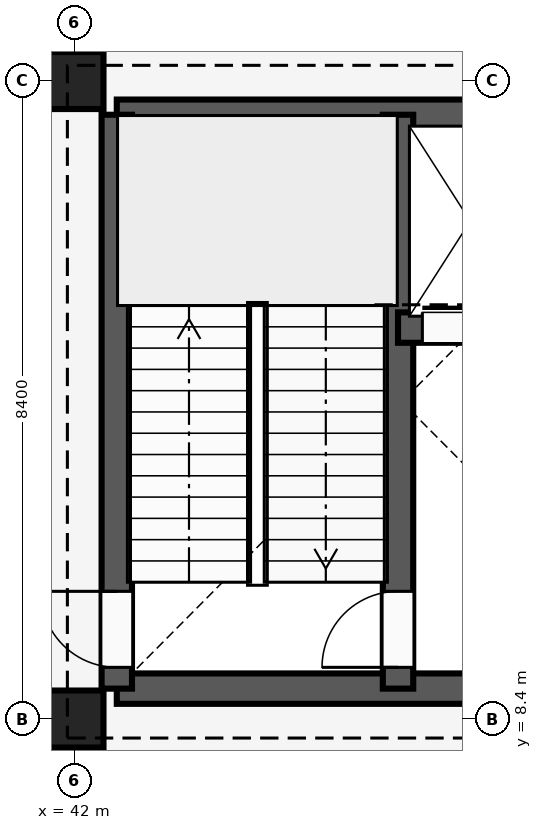
"""IFC4 building model, lengths in metres.
Left out: names, types, materials, properties, quantities, classifications, styles, units other than length and angle.
Written with IfcOpenShell. Run it as: python <this file> out.ifc"""

import sys

from ifc_helpers import new_model, si_unit, direction, frame, frame_2d, origin, origin_2d, place, context, subcontext, project, spatial, rectangle, extrude, element, fill, save


model = new_model("IFC4")
c1 = context("Model", 3, precision=1e-05, world=origin(), true_north=direction((0.0, 1.0)))
c2 = subcontext(c1, "Body", "Model", "MODEL_VIEW")
j1 = project(units=[si_unit("LENGTHUNIT", "METRE"), si_unit("PLANEANGLEUNIT", "RADIAN")], contexts=[c1])
p1 = place(None, origin())
s1 = spatial("IfcSite", under=j1, at=p1, CompositionType="ELEMENT")
p2 = place(p1, origin())
s2 = spatial("IfcBuilding", under=s1, at=p2, CompositionType="ELEMENT")
p3 = place(p2, frame((0.0, 0.0, 8.1)))
s3 = spatial("IfcBuildingStorey", under=s2, at=p3, CompositionType="ELEMENT", Elevation=8.1)
for number, where, z_axis, x_axis in (
    (1, (42.0, 8.4, 0.0), (0.0, 0.0, 1.0), (1.0, 0.0, 0.0)),
    (2, (42.0, 16.8, 0.0), (0.0, 0.0, 1.0), (1.0, 0.0, 0.0)),
):
    element("IfcColumn", number, at=place(p3, frame(where, z_axis=z_axis, x_axis=x_axis)), inside=s3, PredefinedType="COLUMN", context=c2, shape_type="SweptSolid", body=[
        extrude(rectangle(XDim=0.75, YDim=0.75, at=origin_2d()), origin(), (0.0, 0.0, 1.0), 4.8),
    ])
p4 = place(p3, frame((42.55, 8.8, 0.0), z_axis=(0.0, 0.0, 1.0), x_axis=(1.0, 0.0, 0.0)))
e3 = element("IfcWall", 3, at=p4, inside=s3, PredefinedType="SHEAR", context=c2, shape_type="SweptSolid", body=[
    extrude(rectangle(XDim=7.5, YDim=0.4, at=frame_2d((3.75, 0.0))), origin(), (0.0, 0.0, 1.0), 4.52),
])
p5 = place(p4, frame((4.85, 0.0, 0.0)))
e4 = element("IfcOpeningElement", 4, at=p5, cuts=e3, PredefinedType="OPENING", context=c2, shape_type="SweptSolid", body=[
    extrude(rectangle(XDim=1.2, YDim=2.2, at=frame_2d((0.6, 1.1))), frame((0.0, 0.21, 0.0), z_axis=(0.0, -1.0, 0.0), x_axis=(1.0, 0.0, 0.0)), (0.0, 0.0, 1.0), 0.42),
])
p6 = place(p3, frame((42.55, 16.35, 0.0), z_axis=(0.0, 0.0, 1.0), x_axis=(1.0, 0.0, 0.0)))
e5 = element("IfcWall", 5, at=p6, inside=s3, PredefinedType="SHEAR", context=c2, shape_type="SweptSolid", body=[
    extrude(rectangle(XDim=7.5, YDim=0.4, at=frame_2d((3.75, 0.0))), origin(), (0.0, 0.0, 1.0), 4.52),
])
p7 = place(p3, frame((42.55, 8.8, 0.0), z_axis=(0.0, 0.0, 1.0), x_axis=(0.0, 1.0, 0.0)))
e6 = element("IfcWall", 6, at=p7, inside=s3, PredefinedType="SHEAR", context=c2, shape_type="SweptSolid", body=[
    extrude(rectangle(XDim=7.55, YDim=0.4, at=frame_2d((3.775, 0.0))), origin(), (0.0, 0.0, 1.0), 4.52),
])
p8 = place(p7, frame((0.28, 0.0, 0.0)))
e7 = element("IfcOpeningElement", 7, at=p8, cuts=e6, PredefinedType="OPENING", context=c2, shape_type="SweptSolid", body=[
    extrude(rectangle(XDim=1.0, YDim=2.15, at=frame_2d((0.5, 1.075))), frame((0.0, 0.21, 0.0), z_axis=(0.0, -1.0, 0.0), x_axis=(1.0, 0.0, 0.0)), (0.0, 0.0, 1.0), 0.42),
])
p9 = place(p3, frame((46.25, 8.8, 0.0), z_axis=(0.0, 0.0, 1.0), x_axis=(0.0, 1.0, 0.0)))
e8 = element("IfcWall", 8, at=p9, inside=s3, PredefinedType="SHEAR", context=c2, shape_type="SweptSolid", body=[
    extrude(rectangle(XDim=7.55, YDim=0.4, at=frame_2d((3.775, 0.0))), origin(), (0.0, 0.0, 1.0), 4.52),
])
p10 = place(p9, frame((0.28, 0.0, 0.0)))
e9 = element("IfcOpeningElement", 9, at=p10, cuts=e8, PredefinedType="OPENING", context=c2, shape_type="SweptSolid", body=[
    extrude(rectangle(XDim=1.0, YDim=2.15, at=frame_2d((0.5, 1.075))), frame((0.0, 0.21, 0.0), z_axis=(0.0, -1.0, 0.0), x_axis=(1.0, 0.0, 0.0)), (0.0, 0.0, 1.0), 0.42),
])
p11 = place(p3, frame((46.25, 13.55, 0.0), z_axis=(0.0, 0.0, 1.0), x_axis=(1.0, 0.0, 0.0)))
e10 = element("IfcWall", 10, at=p11, inside=s3, PredefinedType="SHEAR", context=c2, shape_type="SweptSolid", body=[
    extrude(rectangle(XDim=3.8, YDim=0.4, at=frame_2d((1.9, 0.0))), origin(), (0.0, 0.0, 1.0), 4.52),
])
p12 = place(p11, frame((0.32, 0.0, 0.0)))
e11 = element("IfcOpeningElement", 11, at=p12, cuts=e10, PredefinedType="OPENING", context=c2, shape_type="SweptSolid", body=[
    extrude(rectangle(XDim=1.4, YDim=2.25, at=frame_2d((0.7, 1.125))), frame((0.0, 0.21, 0.0), z_axis=(0.0, -1.0, 0.0), x_axis=(1.0, 0.0, 0.0)), (0.0, 0.0, 1.0), 0.42),
])
p13 = place(p11, frame((2.04, 0.0, 0.0)))
e12 = element("IfcOpeningElement", 12, at=p13, cuts=e10, PredefinedType="OPENING", context=c2, shape_type="SweptSolid", body=[
    extrude(rectangle(XDim=1.1, YDim=2.15, at=frame_2d((0.55, 1.075))), frame((0.0, 0.21, 0.0), z_axis=(0.0, -1.0, 0.0), x_axis=(1.0, 0.0, 0.0)), (0.0, 0.0, 1.0), 0.42),
])
p14 = place(p3, frame((42.0, 0.14, 0.0), z_axis=(0.0, 0.0, 1.0), x_axis=(0.0, 1.0, 0.0)))
e13 = element("IfcWall", 13, at=p14, inside=s3, PredefinedType="PARTITIONING", context=c2, shape_type="SweptSolid", body=[
    extrude(rectangle(XDim=8.21, YDim=0.13, at=frame_2d((4.105, 0.0))), origin(), (0.0, 0.0, 1.0), 3.84),
])
p15 = place(p14, frame((3.64, 0.0, 0.0)))
e14 = element("IfcOpeningElement", 14, at=p15, cuts=e13, PredefinedType="OPENING", context=c2, shape_type="SweptSolid", body=[
    extrude(rectangle(XDim=1.08, YDim=2.15, at=frame_2d((0.54, 1.075))), frame((0.0, 0.075, 0.0), z_axis=(0.0, -1.0, 0.0), x_axis=(1.0, 0.0, 0.0)), (0.0, 0.0, 1.0), 0.15),
])
p16 = place(p3, frame((42.0, 17.15, 0.0), z_axis=(0.0, 0.0, 1.0), x_axis=(0.0, 1.0, 0.0)))
e15 = element("IfcWall", 15, at=p16, inside=s3, PredefinedType="PARTITIONING", context=c2, shape_type="SweptSolid", body=[
    extrude(rectangle(XDim=7.91, YDim=0.13, at=frame_2d((3.955, 0.0))), origin(), (0.0, 0.0, 1.0), 3.84),
])
p17 = place(p16, frame((3.4, 0.0, 0.0)))
e16 = element("IfcOpeningElement", 16, at=p17, cuts=e15, PredefinedType="OPENING", context=c2, shape_type="SweptSolid", body=[
    extrude(rectangle(XDim=1.05, YDim=2.2, at=frame_2d((0.525, 1.1))), frame((0.0, 0.075, 0.0), z_axis=(0.0, -1.0, 0.0), x_axis=(1.0, 0.0, 0.0)), (0.0, 0.0, 1.0), 0.15),
])
p18 = place(p8, origin())
e17 = element("IfcDoor", 17, at=p18, inside=s3, OperationType="SINGLE_SWING_RIGHT", PredefinedType="DOOR", context=c2, shape_type="SweptSolid", body=[
    extrude(rectangle(XDim=1.0, YDim=2.15, at=frame_2d((0.5, 1.075))), frame((0.0, 0.025, 0.0), z_axis=(0.0, -1.0, 0.0), x_axis=(1.0, 0.0, 0.0)), (0.0, 0.0, 1.0), 0.05),
])
fill(e7, e17)
p19 = place(p10, origin())
e18 = element("IfcDoor", 18, at=p19, inside=s3, OperationType="SINGLE_SWING_LEFT", PredefinedType="DOOR", context=c2, shape_type="SweptSolid", body=[
    extrude(rectangle(XDim=1.0, YDim=2.15, at=frame_2d((0.5, 1.075))), frame((0.0, 0.025, 0.0), z_axis=(0.0, -1.0, 0.0), x_axis=(1.0, 0.0, 0.0)), (0.0, 0.0, 1.0), 0.05),
])
fill(e9, e18)
p20 = place(p12, origin())
e19 = element("IfcDoor", 19, at=p20, inside=s3, OperationType="SLIDING_TO_LEFT", PredefinedType="DOOR", context=c2, shape_type="SweptSolid", body=[
    extrude(rectangle(XDim=1.4, YDim=2.25, at=frame_2d((0.7, 1.125))), frame((0.0, 0.025, 0.0), z_axis=(0.0, -1.0, 0.0), x_axis=(1.0, 0.0, 0.0)), (0.0, 0.0, 1.0), 0.05),
])
fill(e11, e19)
save(model, sys.argv[1])
